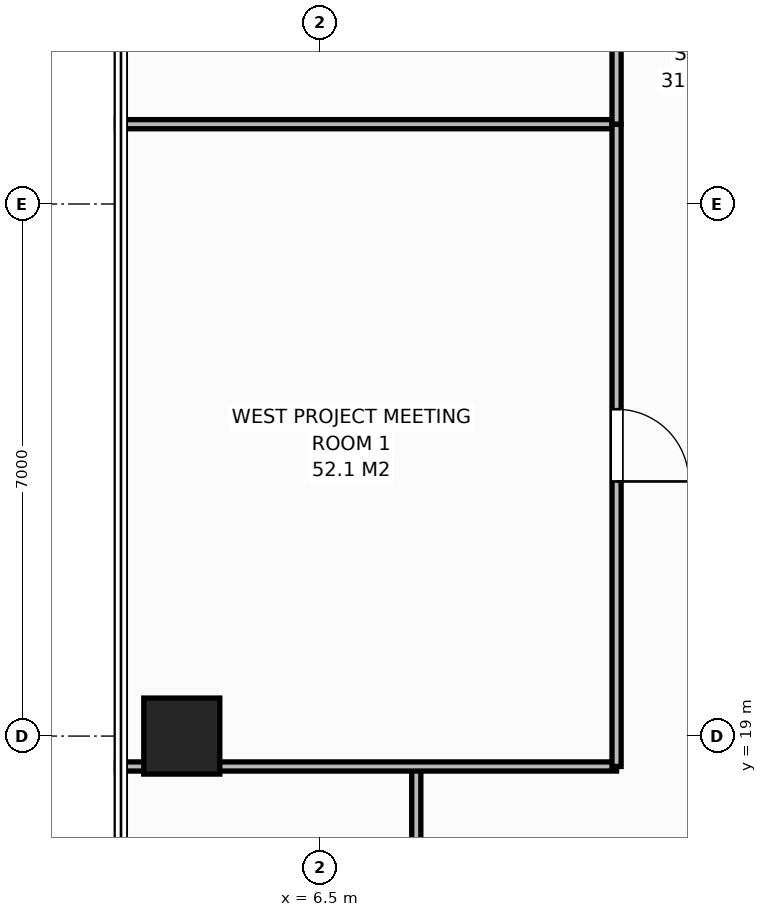
"""IFC4 building model, lengths in metres.
Left out: names, types, materials, properties, quantities, classifications, styles, units other than length and angle.
Written with IfcOpenShell. Run it as: python <this file> out.ifc"""

import sys

from ifc_helpers import new_model, si_unit, direction, frame, frame_2d, origin, origin_2d, place, context, subcontext, project, spatial, rectangle, extrude, element, fill, save


model = new_model("IFC4")
c1 = context("Model", 3, precision=1e-05, world=origin(), true_north=direction((0.0, 1.0)))
c2 = subcontext(c1, "Body", "Model", "MODEL_VIEW")
j1 = project(units=[si_unit("LENGTHUNIT", "METRE"), si_unit("PLANEANGLEUNIT", "RADIAN")], contexts=[c1])
p1 = place(None, origin())
s1 = spatial("IfcSite", under=j1, at=p1, CompositionType="ELEMENT")
p2 = place(p1, origin())
s2 = spatial("IfcBuilding", under=s1, at=p2, CompositionType="ELEMENT")
p3 = place(p2, frame((0.0, 0.0, 178.4)))
s3 = spatial("IfcBuildingStorey", under=s2, at=p3, CompositionType="ELEMENT", Elevation=178.4)
p4 = place(p3, frame((4.68, 19.0, 0.0), z_axis=(0.0, 0.0, 1.0), x_axis=(1.0, 0.0, 0.0)))
e1 = element("IfcColumn", 1, at=p4, inside=s3, PredefinedType="COLUMN", context=c2, shape_type="SweptSolid", body=[
    extrude(rectangle(XDim=1.0, YDim=1.0, at=origin_2d()), origin(), (0.0, 0.0, 1.0), 3.8),
])
p5 = place(p3, frame((7.765, 16.5, 0.0), z_axis=(0.0, 0.0, 1.0), x_axis=(0.0, 1.0, 0.0)))
e2 = element("IfcWall", 2, at=p5, inside=s3, PredefinedType="PARTITIONING", context=c2, shape_type="SweptSolid", body=[
    extrude(rectangle(XDim=2.1, YDim=0.12, at=frame_2d((1.05, 0.0))), origin(), (0.0, 0.0, 1.0), 3.572),
])
for number, where, z_axis, x_axis in (
    (3, (3.82, 18.6, 0.0), (0.0, 0.0, 1.0), (1.0, 0.0, 0.0)),
    (4, (3.82, 27.05, 0.0), (0.0, 0.0, 1.0), (1.0, 0.0, 0.0)),
):
    element("IfcWall", number, at=place(p3, frame(where, z_axis=z_axis, x_axis=x_axis)), inside=s3, PredefinedType="PARTITIONING", context=c2, shape_type="SweptSolid", body=[
        extrude(rectangle(XDim=6.58, YDim=0.12, at=frame_2d((3.29, 0.0))), origin(), (0.0, 0.0, 1.0), 3.572),
    ])
p6 = place(p3, frame((10.4, 18.6, 0.0), z_axis=(0.0, 0.0, 1.0), x_axis=(0.0, 1.0, 0.0)))
e5 = element("IfcWall", 5, at=p6, inside=s3, PredefinedType="PARTITIONING", context=c2, shape_type="SweptSolid", body=[
    extrude(rectangle(XDim=8.45, YDim=0.12, at=frame_2d((4.225, 0.0))), origin(), (0.0, 0.0, 1.0), 3.572),
])
p7 = place(p6, frame((3.75, 0.0, 0.0)))
e6 = element("IfcOpeningElement", 6, at=p7, cuts=e5, PredefinedType="OPENING", context=c2, shape_type="SweptSolid", body=[
    extrude(rectangle(XDim=0.95, YDim=2.15, at=frame_2d((0.475, 1.075))), frame((0.0, 0.07, 0.0), z_axis=(0.0, -1.0, 0.0), x_axis=(1.0, 0.0, 0.0)), (0.0, 0.0, 1.0), 0.14),
])
p8 = place(p3, frame((10.4, 27.05, 0.0), z_axis=(0.0, 0.0, 1.0), x_axis=(0.0, 1.0, 0.0)))
e7 = element("IfcWall", 7, at=p8, inside=s3, PredefinedType="PARTITIONING", context=c2, shape_type="SweptSolid", body=[
    extrude(rectangle(XDim=8.45, YDim=0.12, at=frame_2d((4.225, 0.0))), origin(), (0.0, 0.0, 1.0), 3.572),
])
p9 = place(p8, frame((2.7, 0.0, 0.0)))
e8 = element("IfcOpeningElement", 8, at=p9, cuts=e7, PredefinedType="OPENING", context=c2, shape_type="SweptSolid", body=[
    extrude(rectangle(XDim=0.95, YDim=2.15, at=frame_2d((0.475, 1.075))), frame((0.0, 0.07, 0.0), z_axis=(0.0, -1.0, 0.0), x_axis=(1.0, 0.0, 0.0)), (0.0, 0.0, 1.0), 0.14),
])
p10 = place(p7, origin())
e9 = element("IfcDoor", 9, at=p10, inside=s3, OperationType="SINGLE_SWING_RIGHT", PredefinedType="DOOR", context=c2, shape_type="SweptSolid", body=[
    extrude(rectangle(XDim=0.95, YDim=2.15, at=frame_2d((0.475, 1.075))), frame((0.0, 0.025, 0.0), z_axis=(0.0, -1.0, 0.0), x_axis=(1.0, 0.0, 0.0)), (0.0, 0.0, 1.0), 0.05),
])
fill(e6, e9)
save(model, sys.argv[1])
